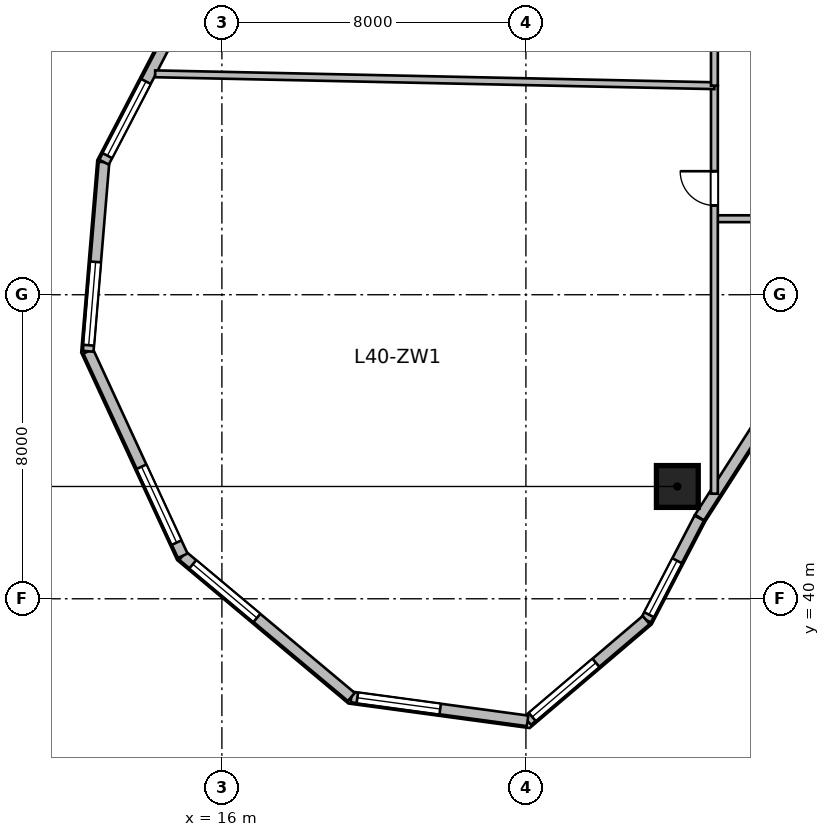
"""IFC4 building model, lengths in metres.
Left out: names, types, materials, properties, quantities, classifications, styles, units other than length and angle.
Written with IfcOpenShell. Run it as: python <this file> out.ifc"""

import sys

from ifc_helpers import new_model, si_unit, direction, frame, frame_2d, origin, origin_2d, place, context, subcontext, project, spatial, rectangle, circle, extrude, source, transform, mapped, element, fill, save


model = new_model("IFC4")
c1 = context("Model", 3, precision=1e-05, world=origin(), true_north=direction((0.0, 1.0)))
c2 = subcontext(c1, "Body", "Model", "MODEL_VIEW")
j1 = project(units=[si_unit("LENGTHUNIT", "METRE"), si_unit("PLANEANGLEUNIT", "RADIAN")], contexts=[c1])
p1 = place(None, origin())
s1 = spatial("IfcSite", under=j1, at=p1, CompositionType="ELEMENT")
p2 = place(p1, origin())
s2 = spatial("IfcBuilding", under=s1, at=p2, CompositionType="ELEMENT")
p3 = place(p2, frame((0.0, 0.0, 166.2)))
s3 = spatial("IfcBuildingStorey", under=s2, at=p3, CompositionType="ELEMENT", Elevation=166.2)
m1 = source(origin(), c2, "Body", "SweptSolid", [
    extrude(circle(Radius=0.55, at=origin_2d()), origin(), (0.0, 0.0, 1.0), 3.9),
])
p4 = place(p3, frame((27.985, 42.955, 0.0), z_axis=(0.0, 0.0, 1.0), x_axis=(-0.690756218984, 0.723087716626, 0.0)))
e1 = element("IfcColumn", 1, at=p4, inside=s3, PredefinedType="COLUMN", context=c2, shape_type="MappedRepresentation", body=[
    mapped(m1, transform((0.0, 0.0, 0.0), scale=1.0)),
])
m2 = source(origin(), c2, "Body", "SweptSolid", [
    extrude(rectangle(XDim=2.981, YDim=0.28, at=frame_2d((1.49, 0.0))), origin(), (0.0, 0.0, 1.0), 3.65),
])
p5 = place(p3, frame((30.179, 44.645, 0.0), z_axis=(0.0, 0.0, 1.0), x_axis=(-0.540194451908, -0.841540227278, 0.0)))
e2 = element("IfcWall", 2, at=p5, inside=s3, PredefinedType="SOLIDWALL", context=c2, shape_type="MappedRepresentation", body=[
    mapped(m2, transform((0.0, 0.0, 0.0), scale=1.0)),
])
m3 = source(origin(), c2, "Body", "SweptSolid", [
    extrude(rectangle(XDim=3.024, YDim=0.28, at=frame_2d((1.512, 0.0))), origin(), (0.0, 0.0, 1.0), 3.65),
])
p6 = place(p3, frame((28.561, 42.123, 0.0), z_axis=(0.0, 0.0, 1.0), x_axis=(-0.461718746531, -0.887026380161, 0.0)))
e3 = element("IfcWall", 3, at=p6, inside=s3, PredefinedType="SOLIDWALL", context=c2, shape_type="MappedRepresentation", body=[
    mapped(m3, transform((0.0, 0.0, 0.0), scale=1.0)),
])
p7 = place(p6, frame((1.264, 0.0, 0.95)))
e4 = element("IfcOpeningElement", 4, at=p7, cuts=e3, PredefinedType="OPENING", context=c2, shape_type="SweptSolid", body=[
    extrude(rectangle(XDim=1.6, YDim=1.9, at=frame_2d((0.8, 0.95))), frame((0.0, 0.15, 0.0), z_axis=(0.0, -1.0, 0.0), x_axis=(1.0, 0.0, 0.0)), (0.0, 0.0, 1.0), 0.3),
])
m4 = source(origin(), c2, "Body", "SweptSolid", [
    extrude(rectangle(XDim=4.096, YDim=0.28, at=frame_2d((2.048, 0.0))), origin(), (0.0, 0.0, 1.0), 3.65),
])
p8 = place(p3, frame((27.164, 39.44, 0.0), z_axis=(0.0, 0.0, 1.0), x_axis=(-0.761926081737, -0.647663991564, 0.0)))
e5 = element("IfcWall", 5, at=p8, inside=s3, PredefinedType="SOLIDWALL", context=c2, shape_type="MappedRepresentation", body=[
    mapped(m4, transform((0.0, 0.0, 0.0), scale=1.0)),
])
p9 = place(p8, frame((1.736, 0.0, 0.95)))
e6 = element("IfcOpeningElement", 6, at=p9, cuts=e5, PredefinedType="OPENING", context=c2, shape_type="SweptSolid", body=[
    extrude(rectangle(XDim=2.2, YDim=2.1, at=frame_2d((1.1, 1.05))), frame((0.0, 0.15, 0.0), z_axis=(0.0, -1.0, 0.0), x_axis=(1.0, 0.0, 0.0)), (0.0, 0.0, 1.0), 0.3),
])
m5 = source(origin(), c2, "Body", "SweptSolid", [
    extrude(rectangle(XDim=4.68, YDim=0.28, at=frame_2d((2.34, 0.0))), origin(), (0.0, 0.0, 1.0), 3.65),
])
p10 = place(p3, frame((24.043, 36.788, 0.0), z_axis=(0.0, 0.0, 1.0), x_axis=(-0.990931146435, 0.134370618162, 0.0)))
e7 = element("IfcWall", 7, at=p10, inside=s3, PredefinedType="SOLIDWALL", context=c2, shape_type="MappedRepresentation", body=[
    mapped(m5, transform((0.0, 0.0, 0.0), scale=1.0)),
])
p11 = place(p10, frame((2.32, 0.0, 0.95)))
e8 = element("IfcOpeningElement", 8, at=p11, cuts=e7, PredefinedType="OPENING", context=c2, shape_type="SweptSolid", body=[
    extrude(rectangle(XDim=2.2, YDim=2.1, at=frame_2d((1.1, 1.05))), frame((0.0, 0.15, 0.0), z_axis=(0.0, -1.0, 0.0), x_axis=(1.0, 0.0, 0.0)), (0.0, 0.0, 1.0), 0.3),
])
m6 = source(origin(), c2, "Body", "SweptSolid", [
    extrude(rectangle(XDim=5.786, YDim=0.28, at=frame_2d((2.893, 0.0))), origin(), (0.0, 0.0, 1.0), 3.65),
])
p12 = place(p3, frame((19.406, 37.417, 0.0), z_axis=(0.0, 0.0, 1.0), x_axis=(-0.766711306852, 0.641992034176, 0.0)))
e9 = element("IfcWall", 9, at=p12, inside=s3, PredefinedType="SOLIDWALL", context=c2, shape_type="MappedRepresentation", body=[
    mapped(m6, transform((0.0, 0.0, 0.0), scale=1.0)),
])
p13 = place(p12, frame((3.24, 0.0, 0.95)))
e10 = element("IfcOpeningElement", 10, at=p13, cuts=e9, PredefinedType="OPENING", context=c2, shape_type="SweptSolid", body=[
    extrude(rectangle(XDim=2.2, YDim=2.1, at=frame_2d((1.1, 1.05))), frame((0.0, 0.15, 0.0), z_axis=(0.0, -1.0, 0.0), x_axis=(1.0, 0.0, 0.0)), (0.0, 0.0, 1.0), 0.3),
])
m7 = source(origin(), c2, "Body", "SweptSolid", [
    extrude(rectangle(XDim=5.927, YDim=0.28, at=frame_2d((2.964, 0.0))), origin(), (0.0, 0.0, 1.0), 3.65),
])
p14 = place(p3, frame((14.969, 41.131, 0.0), z_axis=(0.0, 0.0, 1.0), x_axis=(-0.419656204795, 0.907683132914, 0.0)))
e11 = element("IfcWall", 11, at=p14, inside=s3, PredefinedType="SOLIDWALL", context=c2, shape_type="MappedRepresentation", body=[
    mapped(m7, transform((0.0, 0.0, 0.0), scale=1.0)),
])
p15 = place(p14, frame((0.382, 0.0, 0.95)))
e12 = element("IfcOpeningElement", 12, at=p15, cuts=e11, PredefinedType="OPENING", context=c2, shape_type="SweptSolid", body=[
    extrude(rectangle(XDim=2.2, YDim=2.1, at=frame_2d((1.1, 1.05))), frame((0.0, 0.15, 0.0), z_axis=(0.0, -1.0, 0.0), x_axis=(1.0, 0.0, 0.0)), (0.0, 0.0, 1.0), 0.3),
])
m8 = source(origin(), c2, "Body", "SweptSolid", [
    extrude(rectangle(XDim=4.994, YDim=0.28, at=frame_2d((2.497, 0.0))), origin(), (0.0, 0.0, 1.0), 3.65),
])
p16 = place(p3, frame((12.481, 46.512, 0.0), z_axis=(0.0, 0.0, 1.0), x_axis=(0.083344839916, 0.996520766296, 0.0)))
e13 = element("IfcWall", 13, at=p16, inside=s3, PredefinedType="SOLIDWALL", context=c2, shape_type="MappedRepresentation", body=[
    mapped(m8, transform((0.0, 0.0, 0.0), scale=1.0)),
])
p17 = place(p16, frame((0.16, 0.0, 0.95)))
e14 = element("IfcOpeningElement", 14, at=p17, cuts=e13, PredefinedType="OPENING", context=c2, shape_type="SweptSolid", body=[
    extrude(rectangle(XDim=2.2, YDim=2.1, at=frame_2d((1.1, 1.05))), frame((0.0, 0.15, 0.0), z_axis=(0.0, -1.0, 0.0), x_axis=(1.0, 0.0, 0.0)), (0.0, 0.0, 1.0), 0.3),
])
m9 = source(origin(), c2, "Body", "SweptSolid", [
    extrude(rectangle(XDim=5.171, YDim=0.28, at=frame_2d((2.585, 0.0))), origin(), (0.0, 0.0, 1.0), 3.65),
])
p18 = place(p3, frame((12.898, 51.489, 0.0), z_axis=(0.0, 0.0, 1.0), x_axis=(0.461752581363, 0.887008767491, 0.0)))
e15 = element("IfcWall", 15, at=p18, inside=s3, PredefinedType="SOLIDWALL", context=c2, shape_type="MappedRepresentation", body=[
    mapped(m9, transform((0.0, 0.0, 0.0), scale=1.0)),
])
p19 = place(p18, frame((0.193, 0.0, 0.95)))
e16 = element("IfcOpeningElement", 16, at=p19, cuts=e15, PredefinedType="OPENING", context=c2, shape_type="SweptSolid", body=[
    extrude(rectangle(XDim=2.2, YDim=2.1, at=frame_2d((1.1, 1.05))), frame((0.0, 0.15, 0.0), z_axis=(0.0, -1.0, 0.0), x_axis=(1.0, 0.0, 0.0)), (0.0, 0.0, 1.0), 0.3),
])
m10 = source(origin(), c2, "Body", "SweptSolid", [
    extrude(rectangle(XDim=2.5, YDim=0.18, at=frame_2d((1.25, 0.0))), origin(), (0.0, 0.0, 1.0), 3.65),
])
p20 = place(p3, frame((29.0, 50.0, 0.0), z_axis=(0.0, 0.0, 1.0), x_axis=(1.0, 0.0, 0.0)))
e17 = element("IfcWall", 17, at=p20, inside=s3, PredefinedType="PLUMBINGWALL", context=c2, shape_type="MappedRepresentation", body=[
    mapped(m10, transform((0.0, 0.0, 0.0), scale=1.0)),
])
m11 = source(origin(), c2, "Body", "SweptSolid", [
    extrude(rectangle(XDim=10.735, YDim=0.18, at=frame_2d((5.368, 0.0))), origin(), (0.0, 0.0, 1.0), 2.942),
])
p21 = place(p3, frame((28.96, 42.765, 0.0), z_axis=(0.0, 0.0, 1.0), x_axis=(0.0, 1.0, 0.0)))
e18 = element("IfcWall", 18, at=p21, inside=s3, PredefinedType="PLUMBINGWALL", context=c2, shape_type="MappedRepresentation", body=[
    mapped(m11, transform((0.0, 0.0, 0.0), scale=1.0)),
])
p22 = place(p21, frame((7.585, 0.0, 0.0)))
e19 = element("IfcOpeningElement", 19, at=p22, cuts=e18, PredefinedType="OPENING", context=c2, shape_type="SweptSolid", body=[
    extrude(rectangle(XDim=0.9, YDim=2.08, at=frame_2d((0.45, 1.04))), frame((0.0, 0.1, 0.0), z_axis=(0.0, -1.0, 0.0), x_axis=(1.0, 0.0, 0.0)), (0.0, 0.0, 1.0), 0.2),
])
m12 = source(origin(), c2, "Body", "SweptSolid", [
    extrude(rectangle(XDim=14.72, YDim=0.18, at=frame_2d((7.36, 0.0))), origin(), (0.0, 0.0, 1.0), 3.65),
])
p23 = place(p3, frame((14.243, 53.813, 0.0), z_axis=(0.0, 0.0, 1.0), x_axis=(0.999773932637, -0.021262258118, 0.0)))
e20 = element("IfcWall", 20, at=p23, inside=s3, PredefinedType="PLUMBINGWALL", context=c2, shape_type="MappedRepresentation", body=[
    mapped(m12, transform((0.0, 0.0, 0.0), scale=1.0)),
])
m13 = source(origin(), c2, "Body", "SweptSolid", [
    extrude(rectangle(XDim=6.5, YDim=0.18, at=frame_2d((3.25, 0.0))), origin(), (0.0, 0.0, 1.0), 3.081),
])
p24 = place(p3, frame((28.96, 53.5, 0.0), z_axis=(0.0, 0.0, 1.0), x_axis=(0.0, 1.0, 0.0)))
e21 = element("IfcWall", 21, at=p24, inside=s3, PredefinedType="PLUMBINGWALL", context=c2, shape_type="MappedRepresentation", body=[
    mapped(m13, transform((0.0, 0.0, 0.0), scale=1.0)),
])
p25 = place(p24, frame((2.8, 0.0, 0.0)))
e22 = element("IfcOpeningElement", 22, at=p25, cuts=e21, PredefinedType="OPENING", context=c2, shape_type="SweptSolid", body=[
    extrude(rectangle(XDim=0.9, YDim=2.08, at=frame_2d((0.45, 1.04))), frame((0.0, 0.1, 0.0), z_axis=(0.0, -1.0, 0.0), x_axis=(1.0, 0.0, 0.0)), (0.0, 0.0, 1.0), 0.2),
])
m14 = source(origin(), c2, "Body", "SweptSolid", [
    extrude(rectangle(XDim=1.6, YDim=1.9, at=frame_2d((0.8, 0.95))), frame((0.0, 0.03, 0.0), z_axis=(0.0, -1.0, 0.0), x_axis=(1.0, 0.0, 0.0)), (0.0, 0.0, 1.0), 0.06),
])
p26 = place(p7, origin())
e23 = element("IfcWindow", 23, at=p26, inside=s3, PartitioningType="SINGLE_PANEL", PredefinedType="WINDOW", context=c2, shape_type="MappedRepresentation", body=[
    mapped(m14, transform((0.0, 0.0, 0.0), scale=1.0)),
])
fill(e4, e23)
m15 = source(origin(), c2, "Body", "SweptSolid", [
    extrude(rectangle(XDim=2.2, YDim=2.1, at=frame_2d((1.1, 1.05))), frame((0.0, 0.03, 0.0), z_axis=(0.0, -1.0, 0.0), x_axis=(1.0, 0.0, 0.0)), (0.0, 0.0, 1.0), 0.06),
])
p27 = place(p9, origin())
e24 = element("IfcWindow", 24, at=p27, inside=s3, PartitioningType="TRIPLE_PANEL_VERTICAL", PredefinedType="WINDOW", context=c2, shape_type="MappedRepresentation", body=[
    mapped(m15, transform((0.0, 0.0, 0.0), scale=1.0)),
])
fill(e6, e24)
p28 = place(p11, origin())
e25 = element("IfcWindow", 25, at=p28, inside=s3, PartitioningType="TRIPLE_PANEL_VERTICAL", PredefinedType="WINDOW", context=c2, shape_type="MappedRepresentation", body=[
    mapped(m15, transform((0.0, 0.0, 0.0), scale=1.0)),
])
fill(e8, e25)
p29 = place(p13, origin())
e26 = element("IfcWindow", 26, at=p29, inside=s3, PartitioningType="TRIPLE_PANEL_VERTICAL", PredefinedType="WINDOW", context=c2, shape_type="MappedRepresentation", body=[
    mapped(m15, transform((0.0, 0.0, 0.0), scale=1.0)),
])
fill(e10, e26)
p30 = place(p15, origin())
e27 = element("IfcWindow", 27, at=p30, inside=s3, PartitioningType="TRIPLE_PANEL_VERTICAL", PredefinedType="WINDOW", context=c2, shape_type="MappedRepresentation", body=[
    mapped(m15, transform((0.0, 0.0, 0.0), scale=1.0)),
])
fill(e12, e27)
p31 = place(p17, origin())
e28 = element("IfcWindow", 28, at=p31, inside=s3, PartitioningType="TRIPLE_PANEL_VERTICAL", PredefinedType="WINDOW", context=c2, shape_type="MappedRepresentation", body=[
    mapped(m15, transform((0.0, 0.0, 0.0), scale=1.0)),
])
fill(e14, e28)
p32 = place(p19, origin())
e29 = element("IfcWindow", 29, at=p32, inside=s3, PartitioningType="TRIPLE_PANEL_VERTICAL", PredefinedType="WINDOW", context=c2, shape_type="MappedRepresentation", body=[
    mapped(m15, transform((0.0, 0.0, 0.0), scale=1.0)),
])
fill(e16, e29)
m16 = source(origin(), c2, "Body", "SweptSolid", [
    extrude(rectangle(XDim=0.9, YDim=2.08, at=frame_2d((0.45, 1.04))), frame((0.0, 0.025, 0.0), z_axis=(0.0, -1.0, 0.0), x_axis=(1.0, 0.0, 0.0)), (0.0, 0.0, 1.0), 0.05),
])
p33 = place(p22, origin())
e30 = element("IfcDoor", 30, at=p33, inside=s3, OperationType="SINGLE_SWING_RIGHT", PredefinedType="DOOR", context=c2, shape_type="MappedRepresentation", body=[
    mapped(m16, transform((0.0, 0.0, 0.0), scale=1.0)),
])
fill(e19, e30)
save(model, sys.argv[1])
